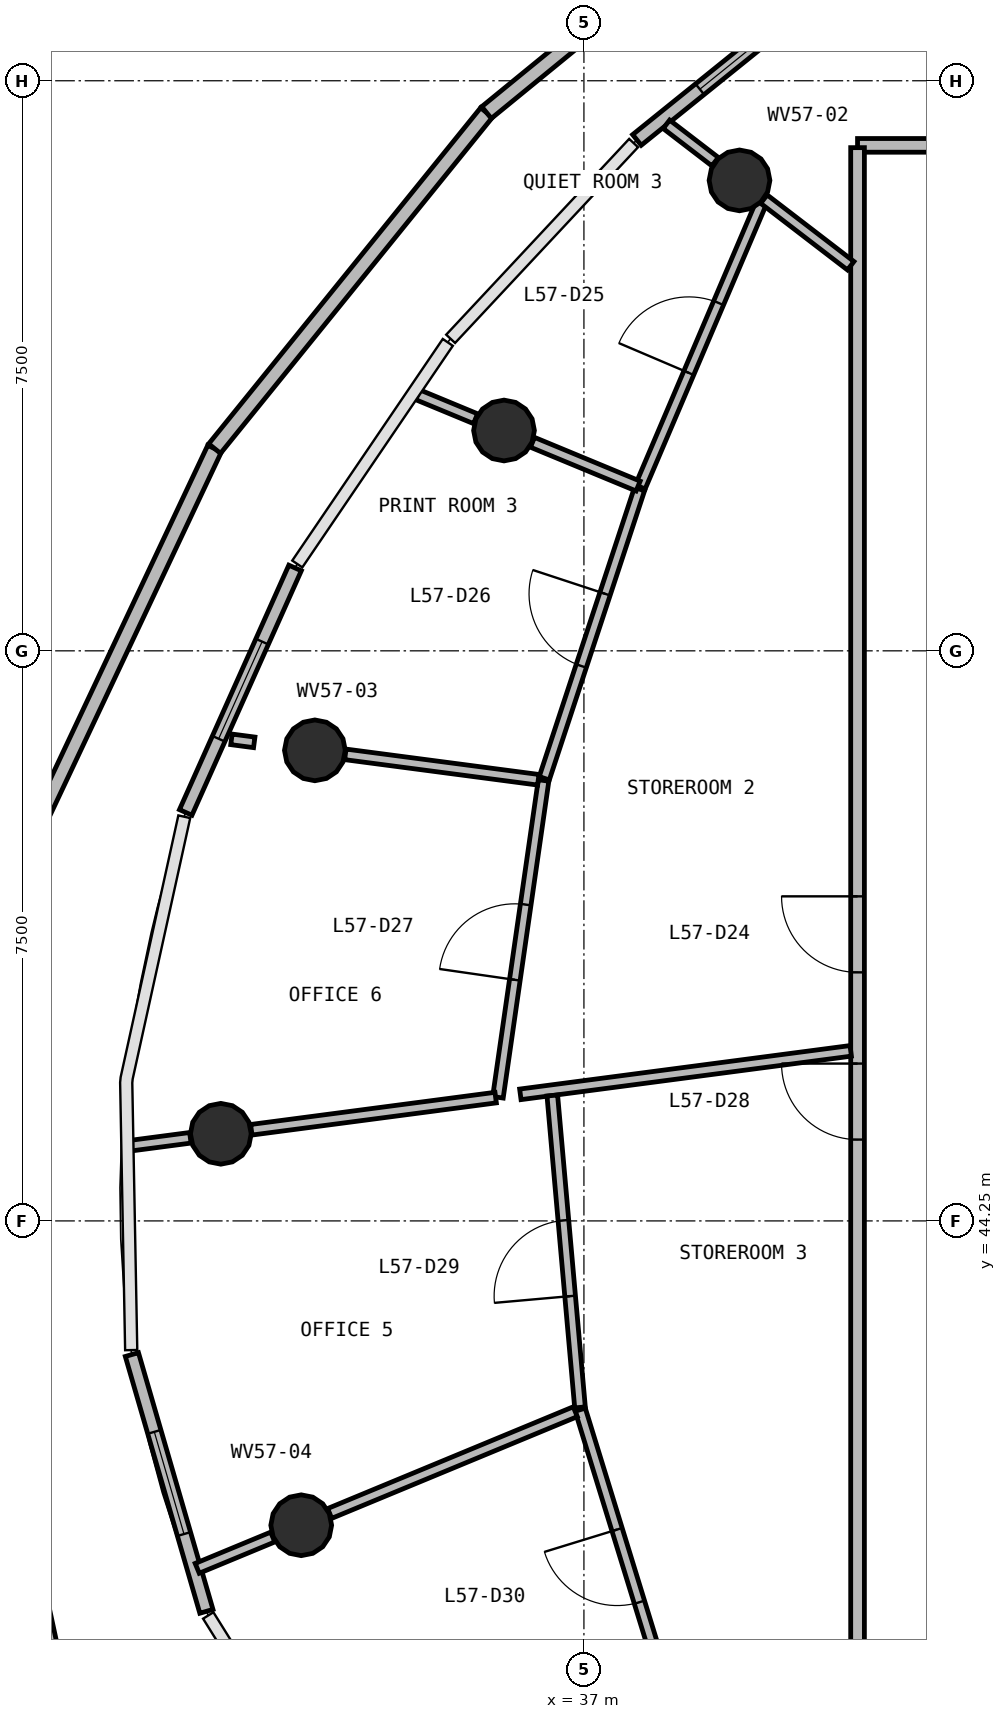
"""IFC4 building model, lengths in metres.
Left out: names, types, materials, properties, quantities, classifications, styles, units other than length and angle.
Written with IfcOpenShell. Run it as: python <this file> out.ifc"""

import sys

from ifc_helpers import new_model, si_unit, direction, frame, frame_2d, origin, origin_2d, place, context, subcontext, project, spatial, rectangle, circle, extrude, source, transform, mapped, element, fill, save


model = new_model("IFC4")
c1 = context("Model", 3, precision=1e-05, world=origin(), true_north=direction((0.0, 1.0)))
c2 = subcontext(c1, "Body", "Model", "MODEL_VIEW")
j1 = project(units=[si_unit("LENGTHUNIT", "METRE"), si_unit("PLANEANGLEUNIT", "RADIAN")], contexts=[c1])
p1 = place(None, origin())
s1 = spatial("IfcSite", under=j1, at=p1, CompositionType="ELEMENT")
p2 = place(p1, origin())
s2 = spatial("IfcBuilding", under=s1, at=p2, CompositionType="ELEMENT")
p3 = place(p2, frame((0.0, 0.0, 234.5)))
s3 = spatial("IfcBuildingStorey", under=s2, at=p3, CompositionType="ELEMENT", Elevation=234.5)
m1 = source(origin(), c2, "Body", "SweptSolid", [
    extrude(circle(Radius=0.4, at=origin_2d()), origin(), (0.0, 0.0, 1.0), 4.22),
])
for number, where, z_axis, x_axis in (
    (1, (39.047, 57.939, -0.32), (0.0, 0.0, 1.0), (1.0, 0.0, 0.0)),
    (2, (35.948, 54.649, -0.32), (0.0, 0.0, 1.0), (1.0, 0.0, 0.0)),
    (3, (33.46, 50.441, -0.32), (0.0, 0.0, 1.0), (1.0, 0.0, 0.0)),
    (4, (32.223, 45.396, -0.32), (0.0, 0.0, 1.0), (1.0, 0.0, 0.0)),
    (5, (33.281, 40.246, -0.32), (0.0, 0.0, 1.0), (1.0, 0.0, 0.0)),
):
    element("IfcColumn", number, at=place(p3, frame(where, z_axis=z_axis, x_axis=x_axis)), inside=s3, PredefinedType="COLUMN", context=c2, shape_type="MappedRepresentation", body=[
        mapped(m1, transform((0.0, 0.0, 0.0), scale=1.0)),
    ])
p4 = place(p3, frame((40.442, 60.685, 0.0), z_axis=(0.0, 0.0, 1.0), x_axis=(-0.77832244361, -0.627864773477, 0.0)))
e6 = element("IfcWall", 6, at=p4, inside=s3, PredefinedType="STANDARD", context=c2, shape_type="SweptSolid", body=[
    extrude(rectangle(XDim=3.526, YDim=0.18, at=frame_2d((1.763, 0.0))), origin(), (0.0, 0.0, 1.0), 3.328),
])
p5 = place(p4, frame((1.063, 0.0, 0.9)))
e7 = element("IfcOpeningElement", 7, at=p5, cuts=e6, PredefinedType="OPENING", context=c2, shape_type="SweptSolid", body=[
    extrude(rectangle(XDim=1.4, YDim=2.0, at=frame_2d((0.7, 1.0))), frame((0.0, 0.1, 0.0), z_axis=(0.0, -1.0, 0.0), x_axis=(1.0, 0.0, 0.0)), (0.0, 0.0, 1.0), 0.2),
])
p6 = place(p3, frame((33.199, 52.84, 0.0), z_axis=(0.0, 0.0, 1.0), x_axis=(-0.408387330325, -0.912808735952, 0.0)))
e8 = element("IfcWall", 8, at=p6, inside=s3, PredefinedType="STANDARD", context=c2, shape_type="SweptSolid", body=[
    extrude(rectangle(XDim=3.523, YDim=0.18, at=frame_2d((1.762, 0.0))), origin(), (0.0, 0.0, 1.0), 3.328),
])
p7 = place(p6, frame((1.062, 0.0, 0.9)))
e9 = element("IfcOpeningElement", 9, at=p7, cuts=e8, PredefinedType="OPENING", context=c2, shape_type="SweptSolid", body=[
    extrude(rectangle(XDim=1.4, YDim=2.0, at=frame_2d((0.7, 1.0))), frame((0.0, 0.1, 0.0), z_axis=(0.0, -1.0, 0.0), x_axis=(1.0, 0.0, 0.0)), (0.0, 0.0, 1.0), 0.2),
])
p8 = place(p3, frame((31.052, 42.492, 0.0), z_axis=(0.0, 0.0, 1.0), x_axis=(0.278669778919, -0.960386981543, 0.0)))
e10 = element("IfcWall", 10, at=p8, inside=s3, PredefinedType="STANDARD", context=c2, shape_type="SweptSolid", body=[
    extrude(rectangle(XDim=3.518, YDim=0.18, at=frame_2d((1.759, 0.0))), origin(), (0.0, 0.0, 1.0), 3.328),
])
p9 = place(p8, frame((1.059, 0.0, 0.9)))
e11 = element("IfcOpeningElement", 11, at=p9, cuts=e10, PredefinedType="OPENING", context=c2, shape_type="SweptSolid", body=[
    extrude(rectangle(XDim=1.4, YDim=2.0, at=frame_2d((0.7, 1.0))), frame((0.0, 0.1, 0.0), z_axis=(0.0, -1.0, 0.0), x_axis=(1.0, 0.0, 0.0)), (0.0, 0.0, 1.0), 0.2),
])
p10 = place(p3, frame((30.087, 38.124, 0.0), z_axis=(0.0, 0.0, 1.0), x_axis=(-0.211215904609, 0.977439431188, 0.0)))
e12 = element("IfcWall", 12, at=p10, inside=s3, PredefinedType="PARAPET", context=c2, shape_type="SweptSolid", body=[
    extrude(rectangle(XDim=5.663, YDim=0.2, at=frame_2d((2.831, 0.0))), origin(), (0.0, 0.0, 1.0), 1.1),
])
p11 = place(p3, frame((29.717, 49.271, 0.0), z_axis=(0.0, 0.0, 1.0), x_axis=(0.426593477443, 0.904443478059, 0.0)))
e13 = element("IfcWall", 13, at=p11, inside=s3, PredefinedType="PARAPET", context=c2, shape_type="SweptSolid", body=[
    extrude(rectangle(XDim=5.682, YDim=0.2, at=frame_2d((2.841, 0.0))), origin(), (0.0, 0.0, 1.0), 1.1),
])
p12 = place(p3, frame((32.141, 54.411, 0.0), z_axis=(0.0, 0.0, 1.0), x_axis=(0.629119189676, 0.777308848002, 0.0)))
e14 = element("IfcWall", 14, at=p12, inside=s3, PredefinedType="PARAPET", context=c2, shape_type="SweptSolid", body=[
    extrude(rectangle(XDim=5.687, YDim=0.2, at=frame_2d((2.844, 0.0))), origin(), (0.0, 0.0, 1.0), 1.1),
])
p13 = place(p3, frame((35.719, 58.832, 0.0), z_axis=(0.0, 0.0, 1.0), x_axis=(0.77415990789, 0.632990076554, 0.0)))
e15 = element("IfcWall", 15, at=p13, inside=s3, PredefinedType="PARAPET", context=c2, shape_type="SweptSolid", body=[
    extrude(rectangle(XDim=5.69, YDim=0.2, at=frame_2d((2.845, 0.0))), origin(), (0.0, 0.0, 1.0), 1.1),
])
p14 = place(p3, frame((40.6, 58.4, 0.0), z_axis=(0.0, 0.0, 1.0), x_axis=(1.0, 0.0, 0.0)))
e16 = element("IfcWall", 16, at=p14, inside=s3, PredefinedType="PARTITIONING", context=c2, shape_type="SweptSolid", body=[
    extrude(rectangle(XDim=21.761, YDim=0.18, at=frame_2d((10.881, 0.0))), origin(), (0.0, 0.0, 1.0), 2.88),
])
p15 = place(p14, frame((13.011, 0.0, 0.0)))
e17 = element("IfcOpeningElement", 17, at=p15, cuts=e16, PredefinedType="OPENING", context=c2, shape_type="SweptSolid", body=[
    extrude(rectangle(XDim=0.9, YDim=2.1, at=frame_2d((0.45, 1.05))), frame((0.0, 0.1, 0.0), z_axis=(0.0, -1.0, 0.0), x_axis=(1.0, 0.0, 0.0)), (0.0, 0.0, 1.0), 0.2),
])
p16 = place(p14, frame((10.411, 0.0, 0.0)))
e18 = element("IfcOpeningElement", 18, at=p16, cuts=e16, PredefinedType="OPENING", context=c2, shape_type="SweptSolid", body=[
    extrude(rectangle(XDim=0.9, YDim=2.1, at=frame_2d((0.45, 1.05))), frame((0.0, 0.1, 0.0), z_axis=(0.0, -1.0, 0.0), x_axis=(1.0, 0.0, 0.0)), (0.0, 0.0, 1.0), 0.2),
])
p17 = place(p14, frame((8.711, 0.0, 0.0)))
e19 = element("IfcOpeningElement", 19, at=p17, cuts=e16, PredefinedType="OPENING", context=c2, shape_type="SweptSolid", body=[
    extrude(rectangle(XDim=1.0, YDim=2.1, at=frame_2d((0.5, 1.05))), frame((0.0, 0.1, 0.0), z_axis=(0.0, -1.0, 0.0), x_axis=(1.0, 0.0, 0.0)), (0.0, 0.0, 1.0), 0.2),
])
p18 = place(p14, frame((16.111, 0.0, 0.0)))
e20 = element("IfcOpeningElement", 20, at=p18, cuts=e16, PredefinedType="OPENING", context=c2, shape_type="SweptSolid", body=[
    extrude(rectangle(XDim=1.0, YDim=2.1, at=frame_2d((0.5, 1.05))), frame((0.0, 0.1, 0.0), z_axis=(0.0, -1.0, 0.0), x_axis=(1.0, 0.0, 0.0)), (0.0, 0.0, 1.0), 0.2),
])
p19 = place(p3, frame((40.6, 37.63, 0.0), z_axis=(0.0, 0.0, 1.0), x_axis=(0.0, 1.0, 0.0)))
e21 = element("IfcWall", 21, at=p19, inside=s3, PredefinedType="PARTITIONING", context=c2, shape_type="SweptSolid", body=[
    extrude(rectangle(XDim=20.74, YDim=0.18, at=frame_2d((10.37, 0.0))), origin(), (0.0, 0.0, 1.0), 2.88),
])
p20 = place(p19, frame((9.89, 0.0, 0.0)))
e22 = element("IfcOpeningElement", 22, at=p20, cuts=e21, PredefinedType="OPENING", context=c2, shape_type="SweptSolid", body=[
    extrude(rectangle(XDim=1.0, YDim=2.1, at=frame_2d((0.5, 1.05))), frame((0.0, 0.1, 0.0), z_axis=(0.0, -1.0, 0.0), x_axis=(1.0, 0.0, 0.0)), (0.0, 0.0, 1.0), 0.2),
])
p21 = place(p19, frame((7.69, 0.0, 0.0)))
e23 = element("IfcOpeningElement", 23, at=p21, cuts=e21, PredefinedType="OPENING", context=c2, shape_type="SweptSolid", body=[
    extrude(rectangle(XDim=1.0, YDim=2.1, at=frame_2d((0.5, 1.05))), frame((0.0, 0.1, 0.0), z_axis=(0.0, -1.0, 0.0), x_axis=(1.0, 0.0, 0.0)), (0.0, 0.0, 1.0), 0.2),
])
p22 = place(p3, frame((38.264, 37.496, 0.0), z_axis=(0.0, 0.0, 1.0), x_axis=(-0.293913060846, 0.955832157162, 0.0)))
e24 = element("IfcWall", 24, at=p22, inside=s3, PredefinedType="PARTITIONING", context=c2, shape_type="SweptSolid", body=[
    extrude(rectangle(XDim=4.468, YDim=0.14, at=frame_2d((2.234, 0.0))), origin(), (0.0, 0.0, 1.0), 2.88),
])
p23 = place(p22, frame((1.818, 0.0, 0.0)))
e25 = element("IfcOpeningElement", 25, at=p23, cuts=e24, PredefinedType="OPENING", context=c2, shape_type="SweptSolid", body=[
    extrude(rectangle(XDim=1.0, YDim=2.1, at=frame_2d((0.5, 1.05))), frame((0.0, 0.08, 0.0), z_axis=(0.0, -1.0, 0.0), x_axis=(1.0, 0.0, 0.0)), (0.0, 0.0, 1.0), 0.16),
])
p24 = place(p3, frame((36.164, 45.915, 0.0), z_axis=(0.0, 0.0, 1.0), x_axis=(0.991443487812, 0.130536625031, 0.0)))
e26 = element("IfcWall", 26, at=p24, inside=s3, PredefinedType="PARTITIONING", context=c2, shape_type="SweptSolid", body=[
    extrude(rectangle(XDim=4.384, YDim=0.14, at=frame_2d((2.192, 0.0))), origin(), (0.0, 0.0, 1.0), 2.88),
])
p25 = place(p3, frame((36.948, 41.796, 0.0), z_axis=(0.0, 0.0, 1.0), x_axis=(-0.088537177072, 0.996072872975, 0.0)))
e27 = element("IfcWall", 27, at=p25, inside=s3, PredefinedType="PARTITIONING", context=c2, shape_type="SweptSolid", body=[
    extrude(rectangle(XDim=4.12, YDim=0.14, at=frame_2d((2.06, 0.0))), origin(), (0.0, 0.0, 1.0), 2.88),
])
p26 = place(p25, frame((1.469, 0.0, 0.0)))
e28 = element("IfcOpeningElement", 28, at=p26, cuts=e27, PredefinedType="OPENING", context=c2, shape_type="SweptSolid", body=[
    extrude(rectangle(XDim=1.0, YDim=2.1, at=frame_2d((0.5, 1.05))), frame((0.0, 0.08, 0.0), z_axis=(0.0, -1.0, 0.0), x_axis=(1.0, 0.0, 0.0)), (0.0, 0.0, 1.0), 0.16),
])
p27 = place(p3, frame((35.868, 45.876, 0.0), z_axis=(0.0, 0.0, 1.0), x_axis=(0.142606161413, 0.989779512178, 0.0)))
e29 = element("IfcWall", 29, at=p27, inside=s3, PredefinedType="PARTITIONING", context=c2, shape_type="SweptSolid", body=[
    extrude(rectangle(XDim=4.211, YDim=0.14, at=frame_2d((2.106, 0.0))), origin(), (0.0, 0.0, 1.0), 2.88),
])
p28 = place(p27, frame((1.562, 0.0, 0.0)))
e30 = element("IfcOpeningElement", 30, at=p28, cuts=e29, PredefinedType="OPENING", context=c2, shape_type="SweptSolid", body=[
    extrude(rectangle(XDim=1.0, YDim=2.1, at=frame_2d((0.5, 1.05))), frame((0.0, 0.08, 0.0), z_axis=(0.0, -1.0, 0.0), x_axis=(1.0, 0.0, 0.0)), (0.0, 0.0, 1.0), 0.16),
])
p29 = place(p3, frame((37.741, 53.906, 0.0), z_axis=(0.0, 0.0, 1.0), x_axis=(0.391990538721, 0.919969248156, 0.0)))
e31 = element("IfcWall", 31, at=p29, inside=s3, PredefinedType="PARTITIONING", context=c2, shape_type="SweptSolid", body=[
    extrude(rectangle(XDim=4.081, YDim=0.14, at=frame_2d((2.041, 0.0))), origin(), (0.0, 0.0, 1.0), 2.88),
])
p30 = place(p29, frame((1.631, 0.0, 0.0)))
e32 = element("IfcOpeningElement", 32, at=p30, cuts=e31, PredefinedType="OPENING", context=c2, shape_type="SweptSolid", body=[
    extrude(rectangle(XDim=1.0, YDim=2.1, at=frame_2d((0.5, 1.05))), frame((0.0, 0.08, 0.0), z_axis=(0.0, -1.0, 0.0), x_axis=(1.0, 0.0, 0.0)), (0.0, 0.0, 1.0), 0.16),
])
p31 = place(p3, frame((36.478, 50.073, 0.0), z_axis=(0.0, 0.0, 1.0), x_axis=(0.312843173351, 0.949804795149, 0.0)))
e33 = element("IfcWall", 33, at=p31, inside=s3, PredefinedType="PARTITIONING", context=c2, shape_type="SweptSolid", body=[
    extrude(rectangle(XDim=4.006, YDim=0.14, at=frame_2d((2.003, 0.0))), origin(), (0.0, 0.0, 1.0), 2.88),
])
p32 = place(p31, frame((1.556, 0.0, 0.0)))
e34 = element("IfcOpeningElement", 34, at=p32, cuts=e33, PredefinedType="OPENING", context=c2, shape_type="SweptSolid", body=[
    extrude(rectangle(XDim=1.0, YDim=2.1, at=frame_2d((0.5, 1.05))), frame((0.0, 0.08, 0.0), z_axis=(0.0, -1.0, 0.0), x_axis=(1.0, 0.0, 0.0)), (0.0, 0.0, 1.0), 0.16),
])
p33 = place(p3, frame((36.886, 41.74, 0.0), z_axis=(0.0, 0.0, 1.0), x_axis=(-0.923892629166, -0.382651812714, 0.0)))
e35 = element("IfcWall", 35, at=p33, inside=s3, PredefinedType="PARTITIONING", context=c2, shape_type="SweptSolid", body=[
    extrude(rectangle(XDim=3.498, YDim=0.14, at=frame_2d((1.749, 0.0))), origin(), (0.0, 0.0, 1.0), 2.88),
])
p34 = place(p3, frame((35.839, 45.872, 0.0), z_axis=(0.0, 0.0, 1.0), x_axis=(-0.991450707373, -0.13048177976, 0.0)))
e36 = element("IfcWall", 36, at=p34, inside=s3, PredefinedType="PARTITIONING", context=c2, shape_type="SweptSolid", body=[
    extrude(rectangle(XDim=3.243, YDim=0.14, at=frame_2d((1.621, 0.0))), origin(), (0.0, 0.0, 1.0), 2.88),
])
p35 = place(p3, frame((36.4, 50.054, 0.0), z_axis=(0.0, 0.0, 1.0), x_axis=(-0.991443907161, 0.130533439979, 0.0)))
e37 = element("IfcWall", 37, at=p35, inside=s3, PredefinedType="PARTITIONING", context=c2, shape_type="SweptSolid", body=[
    extrude(rectangle(XDim=2.561, YDim=0.14, at=frame_2d((1.28, 0.0))), origin(), (0.0, 0.0, 1.0), 2.88),
])
p36 = place(p3, frame((40.51, 56.817, 0.0), z_axis=(0.0, 0.0, 1.0), x_axis=(-0.793316945216, 0.608808857059, 0.0)))
e38 = element("IfcWall", 38, at=p36, inside=s3, PredefinedType="PARTITIONING", context=c2, shape_type="SweptSolid", body=[
    extrude(rectangle(XDim=1.44, YDim=0.14, at=frame_2d((0.72, 0.0))), origin(), (0.0, 0.0, 1.0), 2.88),
])
p37 = place(p3, frame((37.713, 53.918, 0.0), z_axis=(0.0, 0.0, 1.0), x_axis=(-0.923819085666, 0.382829331373, 0.0)))
e39 = element("IfcWall", 39, at=p37, inside=s3, PredefinedType="PARTITIONING", context=c2, shape_type="SweptSolid", body=[
    extrude(rectangle(XDim=1.505, YDim=0.14, at=frame_2d((0.752, 0.0))), origin(), (0.0, 0.0, 1.0), 2.88),
])
p38 = place(p3, frame((32.906, 40.091, 0.0), z_axis=(0.0, 0.0, 1.0), x_axis=(-0.923853671478, -0.382745860457, 0.0)))
e40 = element("IfcWall", 40, at=p38, inside=s3, PredefinedType="PARTITIONING", context=c2, shape_type="SweptSolid", body=[
    extrude(rectangle(XDim=1.076, YDim=0.14, at=frame_2d((0.538, 0.0))), origin(), (0.0, 0.0, 1.0), 2.88),
])
p39 = place(p3, frame((32.662, 50.546, 0.0), z_axis=(0.0, 0.0, 1.0), x_axis=(-0.991424066083, 0.130684051022, 0.0)))
e41 = element("IfcWall", 41, at=p39, inside=s3, PredefinedType="PARTITIONING", context=c2, shape_type="SweptSolid", body=[
    extrude(rectangle(XDim=0.303, YDim=0.14, at=frame_2d((0.151, 0.0))), origin(), (0.0, 0.0, 1.0), 2.88),
])
p40 = place(p3, frame((35.574, 54.804, 0.0), z_axis=(0.0, 0.0, 1.0), x_axis=(-0.923915786345, 0.38259589614, 0.0)))
e42 = element("IfcWall", 42, at=p40, inside=s3, PredefinedType="PARTITIONING", context=c2, shape_type="SweptSolid", body=[
    extrude(rectangle(XDim=0.824, YDim=0.14, at=frame_2d((0.412, 0.0))), origin(), (0.0, 0.0, 1.0), 2.88),
])
p41 = place(p3, frame((38.726, 58.186, 0.0), z_axis=(0.0, 0.0, 1.0), x_axis=(-0.793387400676, 0.60871703808, 0.0)))
e43 = element("IfcWall", 43, at=p41, inside=s3, PredefinedType="PARTITIONING", context=c2, shape_type="SweptSolid", body=[
    extrude(rectangle(XDim=0.808, YDim=0.14, at=frame_2d((0.404, 0.0))), origin(), (0.0, 0.0, 1.0), 2.88),
])
p42 = place(p3, frame((31.822, 45.344, 0.0), z_axis=(0.0, 0.0, 1.0), x_axis=(-0.991435721486, -0.130595597787, 0.0)))
e44 = element("IfcWall", 44, at=p42, inside=s3, PredefinedType="PARTITIONING", context=c2, shape_type="SweptSolid", body=[
    extrude(rectangle(XDim=0.806, YDim=0.14, at=frame_2d((0.403, 0.0))), origin(), (0.0, 0.0, 1.0), 2.88),
])
m2 = source(origin(), c2, "Body", "SweptSolid", [
    extrude(rectangle(XDim=1.4, YDim=2.0, at=frame_2d((0.7, 1.0))), frame((0.0, 0.03, 0.0), z_axis=(0.0, -1.0, 0.0), x_axis=(1.0, 0.0, 0.0)), (0.0, 0.0, 1.0), 0.06),
])
p43 = place(p5, origin())
e45 = element("IfcWindow", 45, at=p43, inside=s3, PartitioningType="SINGLE_PANEL", PredefinedType="WINDOW", context=c2, shape_type="MappedRepresentation", body=[
    mapped(m2, transform((0.0, 0.0, 0.0), scale=1.0)),
])
fill(e7, e45)
p44 = place(p7, origin())
e46 = element("IfcWindow", 46, at=p44, inside=s3, PartitioningType="SINGLE_PANEL", PredefinedType="WINDOW", context=c2, shape_type="MappedRepresentation", body=[
    mapped(m2, transform((0.0, 0.0, 0.0), scale=1.0)),
])
fill(e9, e46)
p45 = place(p9, origin())
e47 = element("IfcWindow", 47, at=p45, inside=s3, PartitioningType="SINGLE_PANEL", PredefinedType="WINDOW", context=c2, shape_type="MappedRepresentation", body=[
    mapped(m2, transform((0.0, 0.0, 0.0), scale=1.0)),
])
fill(e11, e47)
m3 = source(origin(), c2, "Body", "SweptSolid", [
    extrude(rectangle(XDim=1.0, YDim=2.1, at=frame_2d((0.5, 1.05))), frame((0.0, 0.025, 0.0), z_axis=(0.0, -1.0, 0.0), x_axis=(1.0, 0.0, 0.0)), (0.0, 0.0, 1.0), 0.05),
])
p46 = place(p20, origin())
e48 = element("IfcDoor", 48, at=p46, inside=s3, OperationType="SINGLE_SWING_RIGHT", PredefinedType="DOOR", context=c2, shape_type="MappedRepresentation", body=[
    mapped(m3, transform((0.0, 0.0, 0.0), scale=1.0)),
])
fill(e22, e48)
p47 = place(p30, origin())
e49 = element("IfcDoor", 49, at=p47, inside=s3, OperationType="SINGLE_SWING_LEFT", PredefinedType="DOOR", context=c2, shape_type="MappedRepresentation", body=[
    mapped(m3, transform((0.0, 0.0, 0.0), scale=1.0)),
])
fill(e32, e49)
p48 = place(p32, origin())
e50 = element("IfcDoor", 50, at=p48, inside=s3, OperationType="SINGLE_SWING_RIGHT", PredefinedType="DOOR", context=c2, shape_type="MappedRepresentation", body=[
    mapped(m3, transform((0.0, 0.0, 0.0), scale=1.0)),
])
fill(e34, e50)
p49 = place(p28, origin())
e51 = element("IfcDoor", 51, at=p49, inside=s3, OperationType="SINGLE_SWING_LEFT", PredefinedType="DOOR", context=c2, shape_type="MappedRepresentation", body=[
    mapped(m3, transform((0.0, 0.0, 0.0), scale=1.0)),
])
fill(e30, e51)
p50 = place(p21, origin())
e52 = element("IfcDoor", 52, at=p50, inside=s3, OperationType="SINGLE_SWING_RIGHT", PredefinedType="DOOR", context=c2, shape_type="MappedRepresentation", body=[
    mapped(m3, transform((0.0, 0.0, 0.0), scale=1.0)),
])
fill(e23, e52)
p51 = place(p26, origin())
e53 = element("IfcDoor", 53, at=p51, inside=s3, OperationType="SINGLE_SWING_LEFT", PredefinedType="DOOR", context=c2, shape_type="MappedRepresentation", body=[
    mapped(m3, transform((0.0, 0.0, 0.0), scale=1.0)),
])
fill(e28, e53)
p52 = place(p23, origin())
e54 = element("IfcDoor", 54, at=p52, inside=s3, OperationType="SINGLE_SWING_RIGHT", PredefinedType="DOOR", context=c2, shape_type="MappedRepresentation", body=[
    mapped(m3, transform((0.0, 0.0, 0.0), scale=1.0)),
])
fill(e25, e54)
save(model, sys.argv[1])
